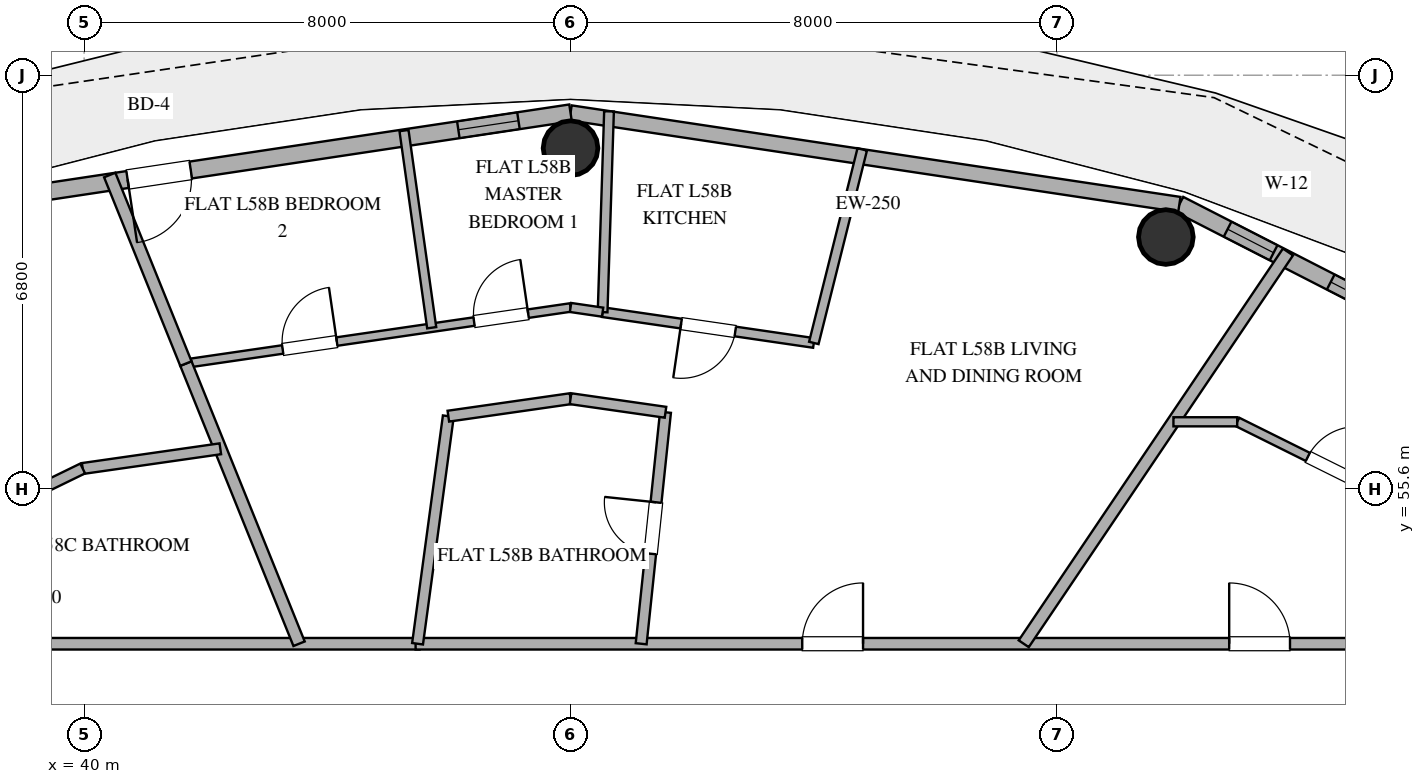
"""IFC4 building model, lengths in metres.
Left out: names, types, materials, properties, quantities, classifications, styles, units other than length and angle.
Written with IfcOpenShell. Run it as: python <this file> out.ifc"""

import sys

from ifc_helpers import new_model, si_unit, direction, frame, frame_2d, origin, origin_2d, place, context, subcontext, project, spatial, rectangle, hollow_circle, extrude, element, fill, save


model = new_model("IFC4")
c1 = context("Model", 3, precision=1e-05, world=origin(), true_north=direction((0.0, 1.0)))
c2 = subcontext(c1, "Body", "Model", "MODEL_VIEW")
j1 = project(units=[si_unit("LENGTHUNIT", "METRE"), si_unit("PLANEANGLEUNIT", "RADIAN")], contexts=[c1])
p1 = place(None, origin())
s1 = spatial("IfcSite", under=j1, at=p1, CompositionType="ELEMENT")
p2 = place(p1, origin())
s2 = spatial("IfcBuilding", under=s1, at=p2, CompositionType="ELEMENT")
p3 = place(p2, frame((0.0, 0.0, 228.0)))
s3 = spatial("IfcBuildingStorey", under=s2, at=p3, CompositionType="ELEMENT", Elevation=228.0)
for number, where, z_axis, x_axis in (
    (1, (57.791, 59.739, 0.0), (0.0, 0.0, 1.0), (1.0, 0.0, 0.0)),
    (2, (48.0, 61.2, 0.0), (0.0, 0.0, 1.0), (1.0, 0.0, 0.0)),
):
    element("IfcColumn", number, at=place(p3, frame(where, z_axis=z_axis, x_axis=x_axis)), inside=s3, PredefinedType="COLUMN", context=c2, shape_type="SweptSolid", body=[
        extrude(hollow_circle(Radius=0.45, WallThickness=0.025, at=origin_2d()), origin(), (0.0, 0.0, 1.0), 3.36),
    ])
p4 = place(p3, frame((66.383, 55.987, 0.0), z_axis=(0.0, 0.0, 1.0), x_axis=(-0.890007394051, 0.455946091699, 0.0)))
e3 = element("IfcWall", 3, at=p4, inside=s3, PredefinedType="SOLIDWALL", context=c2, shape_type="SweptSolid", body=[
    extrude(rectangle(XDim=9.404, YDim=0.28, at=frame_2d((4.702, 0.0))), origin(), (0.0, 0.0, 1.0), 3.36),
])
p5 = place(p4, frame((3.306, 0.0, 0.85)))
e4 = element("IfcOpeningElement", 4, at=p5, cuts=e3, PredefinedType="OPENING", context=c2, shape_type="SweptSolid", body=[
    extrude(rectangle(XDim=1.35, YDim=1.8, at=frame_2d((0.675, 0.9))), frame((0.0, 0.15, 0.0), z_axis=(0.0, -1.0, 0.0), x_axis=(1.0, 0.0, 0.0)), (0.0, 0.0, 1.0), 0.3),
])
p6 = place(p4, frame((5.257, 0.0, 0.85)))
e5 = element("IfcOpeningElement", 5, at=p6, cuts=e3, PredefinedType="OPENING", context=c2, shape_type="SweptSolid", body=[
    extrude(rectangle(XDim=1.35, YDim=1.8, at=frame_2d((0.675, 0.9))), frame((0.0, 0.15, 0.0), z_axis=(0.0, -1.0, 0.0), x_axis=(1.0, 0.0, 0.0)), (0.0, 0.0, 1.0), 0.3),
])
p7 = place(p4, frame((7.663, 0.0, 0.85)))
e6 = element("IfcOpeningElement", 6, at=p7, cuts=e3, PredefinedType="OPENING", context=c2, shape_type="SweptSolid", body=[
    extrude(rectangle(XDim=0.85, YDim=1.8, at=frame_2d((0.425, 0.9))), frame((0.0, 0.15, 0.0), z_axis=(0.0, -1.0, 0.0), x_axis=(1.0, 0.0, 0.0)), (0.0, 0.0, 1.0), 0.3),
])
p8 = place(p3, frame((58.013, 60.274, 0.0), z_axis=(0.0, 0.0, 1.0), x_axis=(-0.988882522213, 0.148698881169, 0.0)))
e7 = element("IfcWall", 7, at=p8, inside=s3, PredefinedType="SOLIDWALL", context=c2, shape_type="SweptSolid", body=[
    extrude(rectangle(XDim=10.125, YDim=0.25, at=frame_2d((5.062, 0.0))), origin(), (0.0, 0.0, 1.0), 3.36),
])
p9 = place(p3, frame((48.0, 61.78, 0.0), z_axis=(0.0, 0.0, 1.0), x_axis=(-0.988882522213, -0.148698881169, 0.0)))
e8 = element("IfcWall", 8, at=p9, inside=s3, PredefinedType="SOLIDWALL", context=c2, shape_type="SweptSolid", body=[
    extrude(rectangle(XDim=10.125, YDim=0.28, at=frame_2d((5.062, 0.0))), origin(), (0.0, 0.0, 1.0), 3.36),
])
p10 = place(p9, frame((6.317, 0.0, 0.0)))
e9 = element("IfcOpeningElement", 9, at=p10, cuts=e8, PredefinedType="OPENING", context=c2, shape_type="SweptSolid", body=[
    extrude(rectangle(XDim=1.05, YDim=2.2, at=frame_2d((0.525, 1.1))), frame((0.0, 0.15, 0.0), z_axis=(0.0, -1.0, 0.0), x_axis=(1.0, 0.0, 0.0)), (0.0, 0.0, 1.0), 0.3),
])
p11 = place(p9, frame((0.866, 0.0, 0.85)))
e10 = element("IfcOpeningElement", 10, at=p11, cuts=e8, PredefinedType="OPENING", context=c2, shape_type="SweptSolid", body=[
    extrude(rectangle(XDim=1.0, YDim=1.8, at=frame_2d((0.5, 0.9))), frame((0.0, 0.15, 0.0), z_axis=(0.0, -1.0, 0.0), x_axis=(1.0, 0.0, 0.0)), (0.0, 0.0, 1.0), 0.3),
])
p12 = place(p3, frame((32.75, 53.05, 0.0), z_axis=(0.0, 0.0, 1.0), x_axis=(1.0, 0.0, 0.0)))
e11 = element("IfcWall", 11, at=p12, inside=s3, PredefinedType="PARTITIONING", context=c2, shape_type="SweptSolid", body=[
    extrude(rectangle(XDim=12.766, YDim=0.19, at=frame_2d((6.383, 0.0))), origin(), (0.0, 0.0, 1.0), 2.72),
])
p13 = place(p3, frame((45.452, 53.05, 0.0), z_axis=(0.0, 0.0, 1.0), x_axis=(1.0, 0.0, 0.0)))
e12 = element("IfcWall", 12, at=p13, inside=s3, PredefinedType="PARTITIONING", context=c2, shape_type="SweptSolid", body=[
    extrude(rectangle(XDim=17.798, YDim=0.19, at=frame_2d((8.899, 0.0))), origin(), (0.0, 0.0, 1.0), 2.72),
])
p14 = place(p13, frame((13.381, 0.0, 0.0)))
e13 = element("IfcOpeningElement", 13, at=p14, cuts=e12, PredefinedType="OPENING", context=c2, shape_type="SweptSolid", body=[
    extrude(rectangle(XDim=1.0, YDim=2.2, at=frame_2d((0.5, 1.1))), frame((0.0, 0.105, 0.0), z_axis=(0.0, -1.0, 0.0), x_axis=(1.0, 0.0, 0.0)), (0.0, 0.0, 1.0), 0.21),
])
p15 = place(p13, frame((6.359, 0.0, 0.0)))
e14 = element("IfcOpeningElement", 14, at=p15, cuts=e12, PredefinedType="OPENING", context=c2, shape_type="SweptSolid", body=[
    extrude(rectangle(XDim=1.0, YDim=2.2, at=frame_2d((0.5, 1.1))), frame((0.0, 0.105, 0.0), z_axis=(0.0, -1.0, 0.0), x_axis=(1.0, 0.0, 0.0)), (0.0, 0.0, 1.0), 0.21),
])
p16 = place(p3, frame((59.799, 59.493, 0.0), z_axis=(0.0, 0.0, 1.0), x_axis=(-0.559208454265, -0.8290270832, 0.0)))
e15 = element("IfcWall", 15, at=p16, inside=s3, PredefinedType="PARTITIONING", context=c2, shape_type="SweptSolid", body=[
    extrude(rectangle(XDim=7.771, YDim=0.2, at=frame_2d((3.886, 0.0))), origin(), (0.0, 0.0, 1.0), 2.72),
])
p17 = place(p3, frame((41.674, 57.657, 0.0), z_axis=(0.0, 0.0, 1.0), x_axis=(0.989537524877, 0.144275732054, 0.0)))
e16 = element("IfcWall", 16, at=p17, inside=s3, PredefinedType="PARTITIONING", context=c2, shape_type="SweptSolid", body=[
    extrude(rectangle(XDim=6.393, YDim=0.14, at=frame_2d((3.197, 0.0))), origin(), (0.0, 0.0, 1.0), 2.72),
])
p18 = place(p17, frame((1.609, 0.0, 0.0)))
e17 = element("IfcOpeningElement", 17, at=p18, cuts=e16, PredefinedType="OPENING", context=c2, shape_type="SweptSolid", body=[
    extrude(rectangle(XDim=0.9, YDim=2.1, at=frame_2d((0.45, 1.05))), frame((0.0, 0.08, 0.0), z_axis=(0.0, -1.0, 0.0), x_axis=(1.0, 0.0, 0.0)), (0.0, 0.0, 1.0), 0.16),
])
p19 = place(p17, frame((4.789, 0.0, 0.0)))
e18 = element("IfcOpeningElement", 18, at=p19, cuts=e16, PredefinedType="OPENING", context=c2, shape_type="SweptSolid", body=[
    extrude(rectangle(XDim=0.9, YDim=2.1, at=frame_2d((0.45, 1.05))), frame((0.0, 0.08, 0.0), z_axis=(0.0, -1.0, 0.0), x_axis=(1.0, 0.0, 0.0)), (0.0, 0.0, 1.0), 0.16),
])
p20 = place(p3, frame((49.161, 53.05, 0.0), z_axis=(0.0, 0.0, 1.0), x_axis=(0.10454201208, 0.994520471237, 0.0)))
e19 = element("IfcWall", 19, at=p20, inside=s3, PredefinedType="PLUMBINGWALL", context=c2, shape_type="SweptSolid", body=[
    extrude(rectangle(XDim=3.828, YDim=0.18, at=frame_2d((1.914, 0.0))), origin(), (0.0, 0.0, 1.0), 2.72),
])
p21 = place(p20, frame((1.489, 0.0, 0.0)))
e20 = element("IfcOpeningElement", 20, at=p21, cuts=e19, PredefinedType="OPENING", context=c2, shape_type="SweptSolid", body=[
    extrude(rectangle(XDim=0.85, YDim=2.1, at=frame_2d((0.425, 1.05))), frame((0.0, 0.1, 0.0), z_axis=(0.0, -1.0, 0.0), x_axis=(1.0, 0.0, 0.0)), (0.0, 0.0, 1.0), 0.2),
])
p22 = place(p3, frame((45.99, 56.792, 0.0), z_axis=(0.0, 0.0, 1.0), x_axis=(-0.134013985284, -0.990979440628, 0.0)))
e21 = element("IfcWall", 21, at=p22, inside=s3, PredefinedType="PLUMBINGWALL", context=c2, shape_type="SweptSolid", body=[
    extrude(rectangle(XDim=3.777, YDim=0.18, at=frame_2d((1.888, 0.0))), origin(), (0.0, 0.0, 1.0), 2.72),
])
p23 = place(p3, frame((52.001, 57.997, 0.0), z_axis=(0.0, 0.0, 1.0), x_axis=(-0.989533601714, 0.144302637118, 0.0)))
e22 = element("IfcWall", 22, at=p23, inside=s3, PredefinedType="PLUMBINGWALL", context=c2, shape_type="SweptSolid", body=[
    extrude(rectangle(XDim=3.511, YDim=0.16, at=frame_2d((1.755, 0.0))), origin(), (0.0, 0.0, 1.0), 2.72),
])
p24 = place(p23, frame((1.305, 0.0, 0.0)))
e23 = element("IfcOpeningElement", 23, at=p24, cuts=e22, PredefinedType="OPENING", context=c2, shape_type="SweptSolid", body=[
    extrude(rectangle(XDim=0.9, YDim=2.1, at=frame_2d((0.45, 1.05))), frame((0.0, 0.09, 0.0), z_axis=(0.0, -1.0, 0.0), x_axis=(1.0, 0.0, 0.0)), (0.0, 0.0, 1.0), 0.18),
])
p25 = place(p3, frame((58.964, 56.7, 0.0), z_axis=(0.0, 0.0, 1.0), x_axis=(0.895471406875, -0.445119039661, 0.0)))
e24 = element("IfcWall", 24, at=p25, inside=s3, PredefinedType="PARTITIONING", context=c2, shape_type="SweptSolid", body=[
    extrude(rectangle(XDim=5.971, YDim=0.15, at=frame_2d((2.986, 0.0))), origin(), (0.0, 0.0, 1.0), 2.72),
])
p26 = place(p25, frame((1.297, 0.0, 0.0)))
e25 = element("IfcOpeningElement", 25, at=p26, cuts=e24, PredefinedType="OPENING", context=c2, shape_type="SweptSolid", body=[
    extrude(rectangle(XDim=0.9, YDim=2.1, at=frame_2d((0.45, 1.05))), frame((0.0, 0.085, 0.0), z_axis=(0.0, -1.0, 0.0), x_axis=(1.0, 0.0, 0.0)), (0.0, 0.0, 1.0), 0.17),
])
p27 = place(p25, frame((4.266, 0.0, 0.0)))
e26 = element("IfcOpeningElement", 26, at=p27, cuts=e24, PredefinedType="OPENING", context=c2, shape_type="SweptSolid", body=[
    extrude(rectangle(XDim=0.9, YDim=2.1, at=frame_2d((0.45, 1.05))), frame((0.0, 0.085, 0.0), z_axis=(0.0, -1.0, 0.0), x_axis=(1.0, 0.0, 0.0)), (0.0, 0.0, 1.0), 0.17),
])
p28 = place(p3, frame((41.674, 57.657, 0.0), z_axis=(0.0, 0.0, 1.0), x_axis=(0.374573524941, -0.927197214412, 0.0)))
e27 = element("IfcWall", 27, at=p28, inside=s3, PredefinedType="PARTITIONING", context=c2, shape_type="SweptSolid", body=[
    extrude(rectangle(XDim=4.969, YDim=0.2, at=frame_2d((2.485, 0.0))), origin(), (0.0, 0.0, 1.0), 2.72),
])
p29 = place(p3, frame((41.674, 57.657, 0.0), z_axis=(0.0, 0.0, 1.0), x_axis=(-0.374572886439, 0.927197472357, 0.0)))
e28 = element("IfcWall", 28, at=p29, inside=s3, PredefinedType="PARTITIONING", context=c2, shape_type="SweptSolid", body=[
    extrude(rectangle(XDim=3.344, YDim=0.2, at=frame_2d((1.672, 0.0))), origin(), (0.0, 0.0, 1.0), 2.72),
])
p30 = place(p3, frame((48.633, 61.805, 0.0), z_axis=(0.0, 0.0, 1.0), x_axis=(-0.031996030035, -0.999487995957, 0.0)))
e29 = element("IfcWall", 29, at=p30, inside=s3, PredefinedType="PLUMBINGWALL", context=c2, shape_type="SweptSolid", body=[
    extrude(rectangle(XDim=3.304, YDim=0.16, at=frame_2d((1.652, 0.0))), origin(), (0.0, 0.0, 1.0), 2.72),
])
p31 = place(p3, frame((52.797, 61.179, 0.0), z_axis=(0.0, 0.0, 1.0), x_axis=(-0.242658184372, -0.970111852086, 0.0)))
e30 = element("IfcWall", 30, at=p31, inside=s3, PredefinedType="PLUMBINGWALL", context=c2, shape_type="SweptSolid", body=[
    extrude(rectangle(XDim=3.281, YDim=0.16, at=frame_2d((1.641, 0.0))), origin(), (0.0, 0.0, 1.0), 2.72),
])
p32 = place(p3, frame((45.717, 58.247, 0.0), z_axis=(0.0, 0.0, 1.0), x_axis=(-0.139134872395, 0.990273440664, 0.0)))
e31 = element("IfcWall", 31, at=p32, inside=s3, PredefinedType="PARTITIONING", context=c2, shape_type="SweptSolid", body=[
    extrude(rectangle(XDim=3.274, YDim=0.15, at=frame_2d((1.637, 0.0))), origin(), (0.0, 0.0, 1.0), 2.72),
])
p33 = place(p3, frame((39.976, 55.932, 0.0), z_axis=(0.0, 0.0, 1.0), x_axis=(0.989917445937, 0.141645509032, 0.0)))
e32 = element("IfcWall", 32, at=p33, inside=s3, PredefinedType="PLUMBINGWALL", context=c2, shape_type="SweptSolid", body=[
    extrude(rectangle(XDim=2.287, YDim=0.18, at=frame_2d((1.144, 0.0))), origin(), (0.0, 0.0, 1.0), 2.72),
])
p34 = place(p3, frame((48.0, 57.08, 0.0), z_axis=(0.0, 0.0, 1.0), x_axis=(-0.989918207634, -0.141640185666, 0.0)))
e33 = element("IfcWall", 33, at=p34, inside=s3, PredefinedType="PLUMBINGWALL", context=c2, shape_type="SweptSolid", body=[
    extrude(rectangle(XDim=2.031, YDim=0.18, at=frame_2d((1.015, 0.0))), origin(), (0.0, 0.0, 1.0), 2.72),
])
p35 = place(p3, frame((49.562, 56.857, 0.0), z_axis=(0.0, 0.0, 1.0), x_axis=(-0.989921615496, 0.141616366194, 0.0)))
e34 = element("IfcWall", 34, at=p35, inside=s3, PredefinedType="PLUMBINGWALL", context=c2, shape_type="SweptSolid", body=[
    extrude(rectangle(XDim=1.577, YDim=0.18, at=frame_2d((0.789, 0.0))), origin(), (0.0, 0.0, 1.0), 2.72),
])
p36 = place(p3, frame((38.679, 55.3, 0.0), z_axis=(0.0, 0.0, 1.0), x_axis=(0.898916394035, 0.438120207861, 0.0)))
e35 = element("IfcWall", 35, at=p36, inside=s3, PredefinedType="PLUMBINGWALL", context=c2, shape_type="SweptSolid", body=[
    extrude(rectangle(XDim=1.443, YDim=0.18, at=frame_2d((0.721, 0.0))), origin(), (0.0, 0.0, 1.0), 2.72),
])
p37 = place(p3, frame((57.915, 56.7, 0.0), z_axis=(0.0, 0.0, 1.0), x_axis=(1.0, 0.0, 0.0)))
e36 = element("IfcWall", 36, at=p37, inside=s3, PredefinedType="PARTITIONING", context=c2, shape_type="SweptSolid", body=[
    extrude(rectangle(XDim=1.049, YDim=0.15, at=frame_2d((0.524, 0.0))), origin(), (0.0, 0.0, 1.0), 2.72),
])
p38 = place(p3, frame((48.527, 58.503, 0.0), z_axis=(0.0, 0.0, 1.0), x_axis=(-0.989523434522, 0.144372339914, 0.0)))
e37 = element("IfcWall", 37, at=p38, inside=s3, PredefinedType="PARTITIONING", context=c2, shape_type="SweptSolid", body=[
    extrude(rectangle(XDim=0.533, YDim=0.15, at=frame_2d((0.266, 0.0))), origin(), (0.0, 0.0, 1.0), 2.72),
])
p39 = place(p6, origin())
e38 = element("IfcWindow", 38, at=p39, inside=s3, PartitioningType="SINGLE_PANEL", PredefinedType="WINDOW", context=c2, shape_type="SweptSolid", body=[
    extrude(rectangle(XDim=1.35, YDim=1.8, at=frame_2d((0.675, 0.9))), frame((0.0, 0.03, 0.0), z_axis=(0.0, -1.0, 0.0), x_axis=(1.0, 0.0, 0.0)), (0.0, 0.0, 1.0), 0.06),
])
fill(e5, e38)
p40 = place(p10, origin())
e39 = element("IfcDoor", 39, at=p40, inside=s3, OperationType="SINGLE_SWING_RIGHT", PredefinedType="DOOR", context=c2, shape_type="SweptSolid", body=[
    extrude(rectangle(XDim=1.05, YDim=2.2, at=frame_2d((0.525, 1.1))), frame((0.0, 0.025, 0.0), z_axis=(0.0, -1.0, 0.0), x_axis=(1.0, 0.0, 0.0)), (0.0, 0.0, 1.0), 0.05),
])
fill(e9, e39)
p41 = place(p7, origin())
e40 = element("IfcWindow", 40, at=p41, inside=s3, PartitioningType="SINGLE_PANEL", PredefinedType="WINDOW", context=c2, shape_type="SweptSolid", body=[
    extrude(rectangle(XDim=0.85, YDim=1.8, at=frame_2d((0.425, 0.9))), frame((0.0, 0.03, 0.0), z_axis=(0.0, -1.0, 0.0), x_axis=(1.0, 0.0, 0.0)), (0.0, 0.0, 1.0), 0.06),
])
fill(e6, e40)
p42 = place(p11, origin())
e41 = element("IfcWindow", 41, at=p42, inside=s3, PartitioningType="SINGLE_PANEL", PredefinedType="WINDOW", context=c2, shape_type="SweptSolid", body=[
    extrude(rectangle(XDim=1.0, YDim=1.8, at=frame_2d((0.5, 0.9))), frame((0.0, 0.03, 0.0), z_axis=(0.0, -1.0, 0.0), x_axis=(1.0, 0.0, 0.0)), (0.0, 0.0, 1.0), 0.06),
])
fill(e10, e41)
p43 = place(p14, origin())
e42 = element("IfcDoor", 42, at=p43, inside=s3, OperationType="SINGLE_SWING_LEFT", PredefinedType="DOOR", context=c2, shape_type="SweptSolid", body=[
    extrude(rectangle(XDim=1.0, YDim=2.2, at=frame_2d((0.5, 1.1))), frame((0.0, 0.025, 0.0), z_axis=(0.0, -1.0, 0.0), x_axis=(1.0, 0.0, 0.0)), (0.0, 0.0, 1.0), 0.05),
])
fill(e13, e42)
p44 = place(p15, origin())
e43 = element("IfcDoor", 43, at=p44, inside=s3, OperationType="SINGLE_SWING_RIGHT", PredefinedType="DOOR", context=c2, shape_type="SweptSolid", body=[
    extrude(rectangle(XDim=1.0, YDim=2.2, at=frame_2d((0.5, 1.1))), frame((0.0, 0.025, 0.0), z_axis=(0.0, -1.0, 0.0), x_axis=(1.0, 0.0, 0.0)), (0.0, 0.0, 1.0), 0.05),
])
fill(e14, e43)
p45 = place(p18, origin())
e44 = element("IfcDoor", 44, at=p45, inside=s3, OperationType="SINGLE_SWING_RIGHT", PredefinedType="DOOR", context=c2, shape_type="SweptSolid", body=[
    extrude(rectangle(XDim=0.9, YDim=2.1, at=frame_2d((0.45, 1.05))), frame((0.0, 0.025, 0.0), z_axis=(0.0, -1.0, 0.0), x_axis=(1.0, 0.0, 0.0)), (0.0, 0.0, 1.0), 0.05),
])
fill(e17, e44)
p46 = place(p19, origin())
e45 = element("IfcDoor", 45, at=p46, inside=s3, OperationType="SINGLE_SWING_RIGHT", PredefinedType="DOOR", context=c2, shape_type="SweptSolid", body=[
    extrude(rectangle(XDim=0.9, YDim=2.1, at=frame_2d((0.45, 1.05))), frame((0.0, 0.025, 0.0), z_axis=(0.0, -1.0, 0.0), x_axis=(1.0, 0.0, 0.0)), (0.0, 0.0, 1.0), 0.05),
])
fill(e18, e45)
p47 = place(p21, origin())
e46 = element("IfcDoor", 46, at=p47, inside=s3, OperationType="SINGLE_SWING_RIGHT", PredefinedType="DOOR", context=c2, shape_type="SweptSolid", body=[
    extrude(rectangle(XDim=0.85, YDim=2.1, at=frame_2d((0.425, 1.05))), frame((0.0, 0.025, 0.0), z_axis=(0.0, -1.0, 0.0), x_axis=(1.0, 0.0, 0.0)), (0.0, 0.0, 1.0), 0.05),
])
fill(e20, e46)
p48 = place(p24, origin())
e47 = element("IfcDoor", 47, at=p48, inside=s3, OperationType="SINGLE_SWING_RIGHT", PredefinedType="DOOR", context=c2, shape_type="SweptSolid", body=[
    extrude(rectangle(XDim=0.9, YDim=2.1, at=frame_2d((0.45, 1.05))), frame((0.0, 0.025, 0.0), z_axis=(0.0, -1.0, 0.0), x_axis=(1.0, 0.0, 0.0)), (0.0, 0.0, 1.0), 0.05),
])
fill(e23, e47)
p49 = place(p26, origin())
e48 = element("IfcDoor", 48, at=p49, inside=s3, OperationType="SINGLE_SWING_RIGHT", PredefinedType="DOOR", context=c2, shape_type="SweptSolid", body=[
    extrude(rectangle(XDim=0.9, YDim=2.1, at=frame_2d((0.45, 1.05))), frame((0.0, 0.025, 0.0), z_axis=(0.0, -1.0, 0.0), x_axis=(1.0, 0.0, 0.0)), (0.0, 0.0, 1.0), 0.05),
])
fill(e25, e48)
save(model, sys.argv[1])
